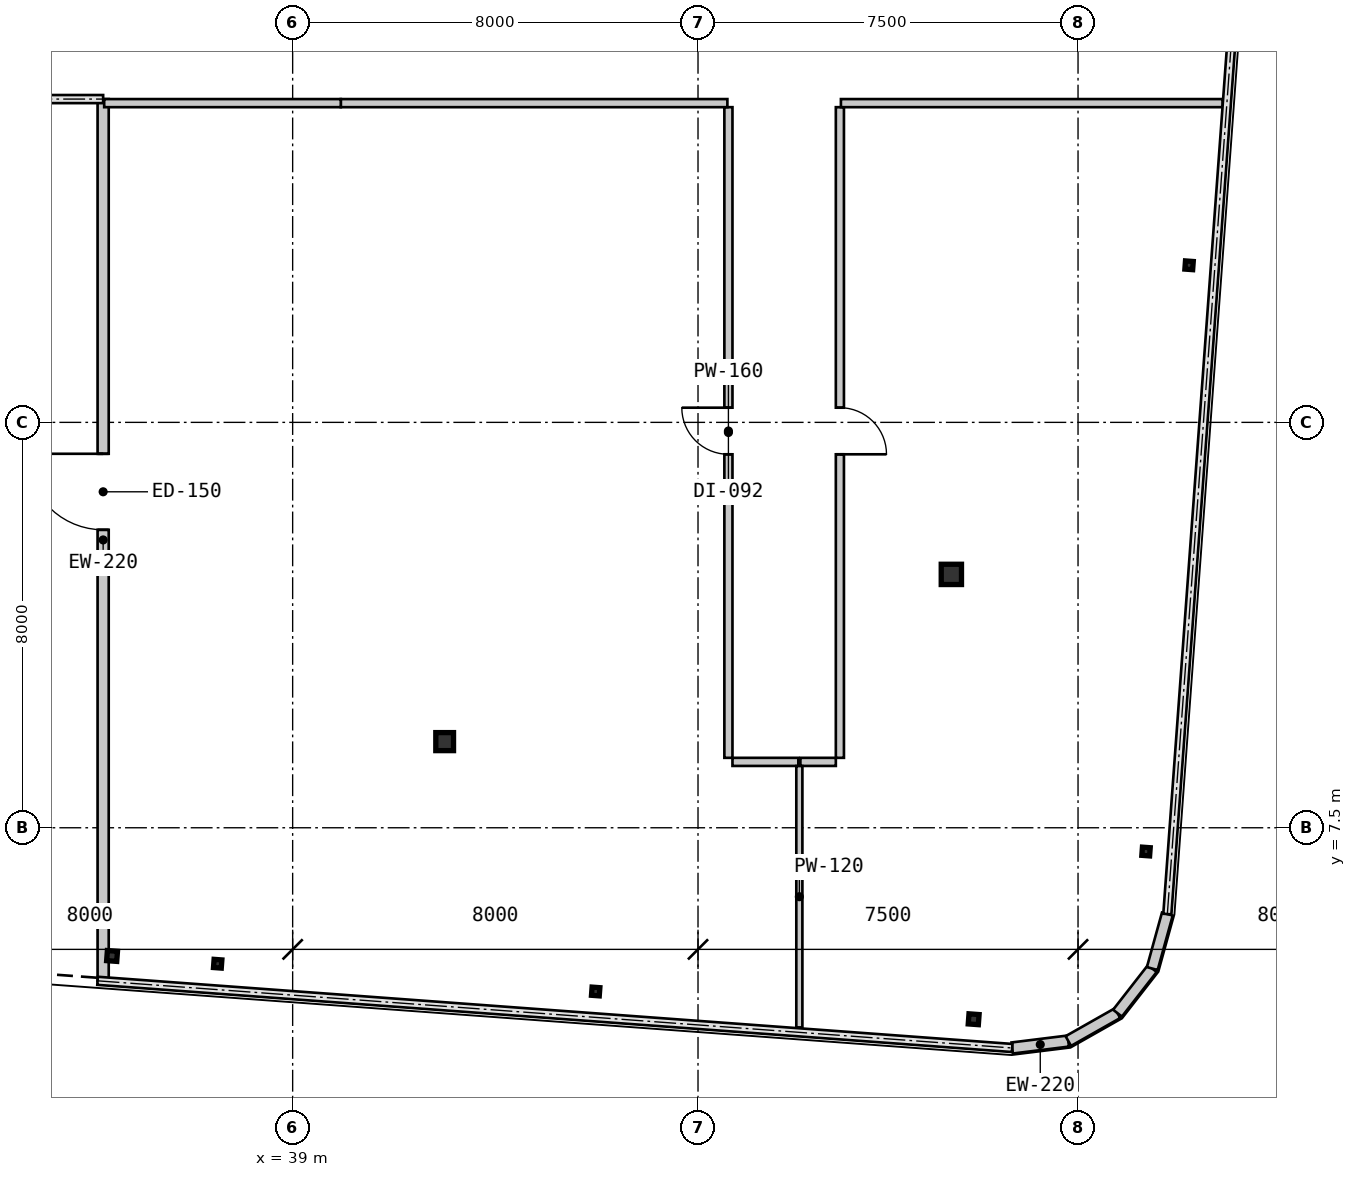
"""IFC4 building model, lengths in metres.
Left out: names, types, materials, properties, quantities, classifications, styles, units other than length and angle.
Written with IfcOpenShell. Run it as: python <this file> out.ifc"""

import sys

from ifc_helpers import new_model, si_unit, direction, frame, frame_2d, origin, origin_2d, place, context, subcontext, project, spatial, rectangle, hollow_rectangle, i_section, extrude, source, transform, mapped, element, fill, save


model = new_model("IFC4")
c1 = context("Model", 3, precision=1e-05, world=origin(), true_north=direction((0.0, 1.0)))
c2 = subcontext(c1, "Body", "Model", "MODEL_VIEW")
j1 = project(units=[si_unit("LENGTHUNIT", "METRE"), si_unit("PLANEANGLEUNIT", "RADIAN")], contexts=[c1])
p1 = place(None, origin())
s1 = spatial("IfcSite", under=j1, at=p1, CompositionType="ELEMENT")
p2 = place(p1, origin())
s2 = spatial("IfcBuilding", under=s1, at=p2, CompositionType="ELEMENT")
p3 = place(p2, frame((0.0, 0.0, 227.15)))
s3 = spatial("IfcBuildingStorey", under=s2, at=p3, CompositionType="ELEMENT", Elevation=227.15)
m1 = source(origin(), c2, "Body", "SweptSolid", [
    extrude(i_section(OverallWidth=0.35, OverallDepth=0.356, WebThickness=0.018, FlangeThickness=0.028, at=origin_2d()), origin(), (0.0, 0.0, 1.0), 3.15),
])
p4 = place(p3, frame((42.0, 9.2, 0.0), z_axis=(0.0, 0.0, 1.0), x_axis=(1.0, 0.0, 0.0)))
e1 = element("IfcColumn", 1, at=p4, inside=s3, PredefinedType="COLUMN", context=c2, shape_type="MappedRepresentation", body=[
    mapped(m1, transform((0.0, 0.0, 0.0), scale=1.0)),
])
m2 = source(origin(), c2, "Body", "SweptSolid", [
    extrude(hollow_rectangle(XDim=0.4, YDim=0.4, WallThickness=0.016, at=origin_2d()), origin(), (0.0, 0.0, 1.0), 3.15),
])
p5 = place(p3, frame((52.0, 12.5, 0.0), z_axis=(0.0, 0.0, 1.0), x_axis=(1.0, 0.0, 0.0)))
e2 = element("IfcColumn", 2, at=p5, inside=s3, PredefinedType="COLUMN", context=c2, shape_type="MappedRepresentation", body=[
    mapped(m2, transform((0.0, 0.0, 0.0), scale=1.0)),
])
m3 = source(origin(), c2, "Body", "SweptSolid", [
    extrude(i_section(OverallWidth=0.154, OverallDepth=0.162, WebThickness=0.008, FlangeThickness=0.011, at=origin_2d()), origin(), (0.0, 0.0, 1.0), 3.15),
])
for number, where, z_axis, x_axis in (
    (3, (37.521, 4.817, 0.0), (0.0, 0.0, 1.0), (0.997, -0.073, 0.0)),
    (4, (44.98, 4.269, 0.0), (0.0, 0.0, 1.0), (0.997, -0.073, 0.0)),
):
    element("IfcColumn", number, at=place(p3, frame(where, z_axis=z_axis, x_axis=x_axis)), inside=s3, PredefinedType="COLUMN", context=c2, shape_type="MappedRepresentation", body=[
        mapped(m3, transform((0.0, 0.0, 0.0), scale=1.0)),
    ])
m4 = source(origin(), c2, "Body", "SweptSolid", [
    extrude(hollow_rectangle(XDim=0.2, YDim=0.2, WallThickness=0.009, at=origin_2d()), origin(), (0.0, 0.0, 1.0), 3.15),
])
p6 = place(p3, frame((52.44, 3.721, 0.0), z_axis=(0.0, 0.0, 1.0), x_axis=(0.997314477224, -0.073238197128, 0.0)))
e5 = element("IfcColumn", 5, at=p6, inside=s3, PredefinedType="COLUMN", context=c2, shape_type="MappedRepresentation", body=[
    mapped(m4, transform((0.0, 0.0, 0.0), scale=1.0)),
])
for number, where, z_axis, x_axis in (
    (6, (55.842, 7.031, 0.0), (0.0, 0.0, 1.0), (0.997, -0.073, 0.0)),
    (7, (56.691, 18.6, 0.0), (0.0, 0.0, 1.0), (0.997, -0.073, 0.0)),
):
    element("IfcColumn", number, at=place(p3, frame(where, z_axis=z_axis, x_axis=x_axis)), inside=s3, PredefinedType="COLUMN", context=c2, shape_type="MappedRepresentation", body=[
        mapped(m3, transform((0.0, 0.0, 0.0), scale=1.0)),
    ])
p7 = place(p3, frame((35.436, 4.97, 0.0), z_axis=(0.0, 0.0, 1.0), x_axis=(0.997314477224, -0.073238197128, 0.0)))
e8 = element("IfcColumn", 8, at=p7, inside=s3, PredefinedType="COLUMN", context=c2, shape_type="MappedRepresentation", body=[
    mapped(m4, transform((0.0, 0.0, 0.0), scale=1.0)),
])
m5 = source(origin(), c2, "Body", "SweptSolid", [
    extrude(rectangle(XDim=1.116, YDim=0.22, at=frame_2d((0.558, 0.0))), origin(), (0.0, 0.0, 1.0), 2.93),
])
p8 = place(p3, frame((53.201, 3.154, 0.0), z_axis=(0.0, 0.0, 1.0), x_axis=(0.992438604032, 0.122742076028, 0.0)))
e9 = element("IfcWall", 9, at=p8, inside=s3, PredefinedType="SOLIDWALL", context=c2, shape_type="MappedRepresentation", body=[
    mapped(m5, transform((0.0, 0.0, 0.0), scale=1.0)),
])
m6 = source(origin(), c2, "Body", "SweptSolid", [
    extrude(rectangle(XDim=1.116, YDim=0.22, at=frame_2d((0.558, 0.0))), origin(), (0.0, 0.0, 1.0), 2.93),
])
p9 = place(p3, frame((54.308, 3.291, 0.0), z_axis=(0.0, 0.0, 1.0), x_axis=(0.869893934693, 0.49323882895, 0.0)))
e10 = element("IfcWall", 10, at=p9, inside=s3, PredefinedType="SOLIDWALL", context=c2, shape_type="MappedRepresentation", body=[
    mapped(m6, transform((0.0, 0.0, 0.0), scale=1.0)),
])
for number, where, z_axis, x_axis in (
    (11, (55.279, 3.841, 0.0), (0.0, 0.0, 1.0), (0.615, 0.789, 0.0)),
    (12, (55.965, 4.721, 0.0), (0.0, 0.0, 1.0), (0.266, 0.964, 0.0)),
):
    element("IfcWall", number, at=place(p3, frame(where, z_axis=z_axis, x_axis=x_axis)), inside=s3, PredefinedType="SOLIDWALL", context=c2, shape_type="MappedRepresentation", body=[
        mapped(m5, transform((0.0, 0.0, 0.0), scale=1.0)),
    ])
m7 = source(origin(), c2, "Body", "SweptSolid", [
    extrude(rectangle(XDim=17.4, YDim=0.22, at=frame_2d((8.7, 0.0))), origin(), (0.0, 0.0, 1.0), 2.93),
])
p10 = place(p3, frame((35.26, 21.88, 0.0), z_axis=(0.0, 0.0, 1.0), x_axis=(0.0, -1.0, 0.0)))
e13 = element("IfcWall", 13, at=p10, inside=s3, PredefinedType="SOLIDWALL", context=c2, shape_type="MappedRepresentation", body=[
    mapped(m7, transform((0.0, 0.0, 0.0), scale=1.0)),
])
m8 = source(origin(), c2, "Body", "SweptSolid", [
    extrude(rectangle(XDim=1.5, YDim=2.2, at=frame_2d((0.75, 1.1))), frame((0.0, 0.12, 0.0), z_axis=(0.0, -1.0, 0.0), x_axis=(1.0, 0.0, 0.0)), (0.0, 0.0, 1.0), 0.24),
])
p11 = place(p10, frame((7.0, 0.0, 0.0)))
e14 = element("IfcOpeningElement", 14, at=p11, cuts=e13, PredefinedType="OPENING", context=c2, shape_type="MappedRepresentation", body=[
    mapped(m8, transform((0.0, 0.0, 0.0), scale=1.0)),
])
m9 = source(origin(), c2, "Body", "SweptSolid", [
    extrude(rectangle(XDim=12.84, YDim=0.16, at=frame_2d((6.42, 0.0))), origin(), (0.0, 0.0, 1.0), 2.93),
])
p12 = place(p3, frame((47.6, 8.88, 0.0), z_axis=(0.0, 0.0, 1.0), x_axis=(0.0, 1.0, 0.0)))
e15 = element("IfcWall", 15, at=p12, inside=s3, PredefinedType="PARTITIONING", context=c2, shape_type="MappedRepresentation", body=[
    mapped(m9, transform((0.0, 0.0, 0.0), scale=1.0)),
])
m10 = source(origin(), c2, "Body", "SweptSolid", [
    extrude(rectangle(XDim=0.92, YDim=2.1, at=frame_2d((0.46, 1.05))), frame((0.0, 0.09, 0.0), z_axis=(0.0, -1.0, 0.0), x_axis=(1.0, 0.0, 0.0)), (0.0, 0.0, 1.0), 0.18),
])
p13 = place(p12, frame((5.99, 0.0, 0.0)))
e16 = element("IfcOpeningElement", 16, at=p13, cuts=e15, PredefinedType="OPENING", context=c2, shape_type="MappedRepresentation", body=[
    mapped(m10, transform((0.0, 0.0, 0.0), scale=1.0)),
])
m11 = source(origin(), c2, "Body", "SweptSolid", [
    extrude(rectangle(XDim=7.63, YDim=0.16, at=frame_2d((3.815, 0.0))), origin(), (0.0, 0.0, 1.0), 2.93),
])
p14 = place(p3, frame((47.58, 21.8, 0.0), z_axis=(0.0, 0.0, 1.0), x_axis=(-1.0, 0.0, 0.0)))
e17 = element("IfcWall", 17, at=p14, inside=s3, PredefinedType="PARTITIONING", context=c2, shape_type="MappedRepresentation", body=[
    mapped(m11, transform((0.0, 0.0, 0.0), scale=1.0)),
])
m12 = source(origin(), c2, "Body", "SweptSolid", [
    extrude(rectangle(XDim=4.67, YDim=0.16, at=frame_2d((2.335, 0.0))), origin(), (0.0, 0.0, 1.0), 2.23),
])
p15 = place(p3, frame((39.95, 21.8, 0.0), z_axis=(0.0, 0.0, 1.0), x_axis=(-1.0, 0.0, 0.0)))
e18 = element("IfcWall", 18, at=p15, inside=s3, PredefinedType="PARTITIONING", context=c2, shape_type="MappedRepresentation", body=[
    mapped(m12, transform((0.0, 0.0, 0.0), scale=1.0)),
])
m13 = source(origin(), c2, "Body", "SweptSolid", [
    extrude(rectangle(XDim=1.3, YDim=0.16, at=frame_2d((0.65, 0.0))), origin(), (0.0, 0.0, 1.0), 2.93),
])
p16 = place(p3, frame((48.98, 8.8, 0.0), z_axis=(0.0, 0.0, 1.0), x_axis=(-1.0, 0.0, 0.0)))
e19 = element("IfcWall", 19, at=p16, inside=s3, PredefinedType="PARTITIONING", context=c2, shape_type="MappedRepresentation", body=[
    mapped(m13, transform((0.0, 0.0, 0.0), scale=1.0)),
])
p17 = place(p3, frame((49.8, 21.72, 0.0), z_axis=(0.0, 0.0, 1.0), x_axis=(0.0, -1.0, 0.0)))
e20 = element("IfcWall", 20, at=p17, inside=s3, PredefinedType="PARTITIONING", context=c2, shape_type="MappedRepresentation", body=[
    mapped(m9, transform((0.0, 0.0, 0.0), scale=1.0)),
])
p18 = place(p17, frame((5.93, 0.0, 0.0)))
e21 = element("IfcOpeningElement", 21, at=p18, cuts=e20, PredefinedType="OPENING", context=c2, shape_type="MappedRepresentation", body=[
    mapped(m10, transform((0.0, 0.0, 0.0), scale=1.0)),
])
m14 = source(origin(), c2, "Body", "SweptSolid", [
    extrude(rectangle(XDim=7.533, YDim=0.16, at=frame_2d((3.767, 0.0))), origin(), (0.0, 0.0, 1.0), 2.93),
])
p19 = place(p3, frame((57.353, 21.8, 0.0), z_axis=(0.0, 0.0, 1.0), x_axis=(-1.0, 0.0, 0.0)))
e22 = element("IfcWall", 22, at=p19, inside=s3, PredefinedType="PARTITIONING", context=c2, shape_type="MappedRepresentation", body=[
    mapped(m14, transform((0.0, 0.0, 0.0), scale=1.0)),
])
m15 = source(origin(), c2, "Body", "SweptSolid", [
    extrude(rectangle(XDim=0.7, YDim=0.16, at=frame_2d((0.35, 0.0))), origin(), (0.0, 0.0, 1.0), 2.93),
])
p20 = place(p3, frame((49.72, 8.8, 0.0), z_axis=(0.0, 0.0, 1.0), x_axis=(-1.0, 0.0, 0.0)))
e23 = element("IfcWall", 23, at=p20, inside=s3, PredefinedType="PARTITIONING", context=c2, shape_type="MappedRepresentation", body=[
    mapped(m15, transform((0.0, 0.0, 0.0), scale=1.0)),
])
m16 = source(origin(), c2, "Body", "SweptSolid", [
    extrude(rectangle(XDim=5.158, YDim=0.12, at=frame_2d((2.579, 0.0))), origin(), (0.0, 0.0, 1.0), 2.93),
])
p21 = place(p3, frame((49.0, 8.718, 0.0), z_axis=(0.0, 0.0, 1.0), x_axis=(0.0, -1.0, 0.0)))
e24 = element("IfcWall", 24, at=p21, inside=s3, PredefinedType="PARTITIONING", context=c2, shape_type="MappedRepresentation", body=[
    mapped(m16, transform((0.0, 0.0, 0.0), scale=1.0)),
])
m17 = source(origin(), c2, "Body", "SweptSolid", [
    extrude(rectangle(XDim=1.5, YDim=2.2, at=frame_2d((0.75, 1.1))), frame((0.0, 0.025, 0.0), z_axis=(0.0, -1.0, 0.0), x_axis=(1.0, 0.0, 0.0)), (0.0, 0.0, 1.0), 0.05),
])
p22 = place(p11, frame((1.5, 0.0, 0.0), z_axis=(0.0, 0.0, 1.0), x_axis=(-1.0, 0.0, 0.0)))
e25 = element("IfcDoor", 25, at=p22, inside=s3, OperationType="SINGLE_SWING_RIGHT", PredefinedType="DOOR", context=c2, shape_type="MappedRepresentation", body=[
    mapped(m17, transform((0.0, 0.0, 0.0), scale=1.0)),
])
fill(e14, e25)
m18 = source(origin(), c2, "Body", "SweptSolid", [
    extrude(rectangle(XDim=0.92, YDim=2.1, at=frame_2d((0.46, 1.05))), frame((0.0, 0.025, 0.0), z_axis=(0.0, -1.0, 0.0), x_axis=(1.0, 0.0, 0.0)), (0.0, 0.0, 1.0), 0.05),
])
p23 = place(p13, origin())
e26 = element("IfcDoor", 26, at=p23, inside=s3, OperationType="SINGLE_SWING_RIGHT", PredefinedType="DOOR", context=c2, shape_type="MappedRepresentation", body=[
    mapped(m18, transform((0.0, 0.0, 0.0), scale=1.0)),
])
fill(e16, e26)
p24 = place(p18, origin())
e27 = element("IfcDoor", 27, at=p24, inside=s3, OperationType="SINGLE_SWING_RIGHT", PredefinedType="DOOR", context=c2, shape_type="MappedRepresentation", body=[
    mapped(m18, transform((0.0, 0.0, 0.0), scale=1.0)),
])
fill(e21, e27)
save(model, sys.argv[1])
